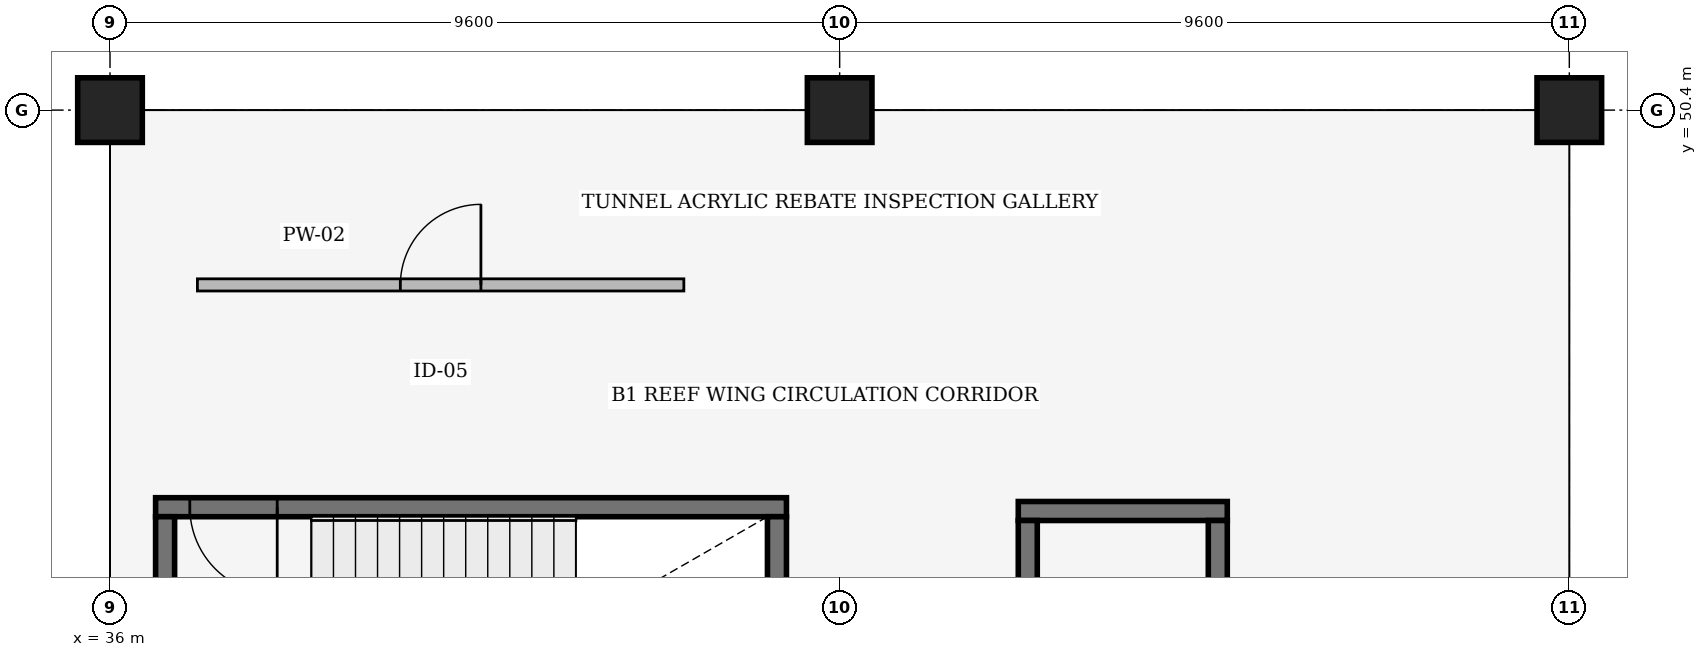
"""IFC4 building model, lengths in metres.
Left out: names, types, materials, properties, quantities, classifications, styles, units other than length and angle.
Written with IfcOpenShell. Run it as: python <this file> out.ifc"""

import sys

from ifc_helpers import new_model, si_unit, direction, frame, frame_2d, origin, origin_2d, place, context, subcontext, project, spatial, rectangle, extrude, element, fill, save


model = new_model("IFC4")
c1 = context("Model", 3, precision=1e-05, world=origin(), true_north=direction((0.0, 1.0)))
c2 = subcontext(c1, "Body", "Model", "MODEL_VIEW")
j1 = project(units=[si_unit("LENGTHUNIT", "METRE"), si_unit("PLANEANGLEUNIT", "RADIAN")], contexts=[c1])
p1 = place(None, origin())
s1 = spatial("IfcSite", under=j1, at=p1, CompositionType="ELEMENT")
p2 = place(p1, origin())
s2 = spatial("IfcBuilding", under=s1, at=p2, CompositionType="ELEMENT")
p3 = place(p2, frame((0.0, 0.0, -4.8)))
s3 = spatial("IfcBuildingStorey", under=s2, at=p3, CompositionType="ELEMENT", Elevation=-4.8)
for number, where, z_axis, x_axis in (
    (1, (36.0, 50.4, 0.0), (0.0, 0.0, 1.0), (1.0, 0.0, 0.0)),
    (2, (45.6, 50.4, 0.0), (0.0, 0.0, 1.0), (1.0, 0.0, 0.0)),
    (3, (55.2, 50.4, 0.0), (0.0, 0.0, 1.0), (1.0, 0.0, 0.0)),
):
    element("IfcColumn", number, at=place(p3, frame(where, z_axis=z_axis, x_axis=x_axis)), inside=s3, PredefinedType="COLUMN", context=c2, shape_type="SweptSolid", body=[
        extrude(rectangle(XDim=0.85, YDim=0.85, at=origin_2d()), origin(), (0.0, 0.0, 1.0), 4.8),
    ])
p4 = place(p3, frame((44.9, 45.175, 0.0), z_axis=(0.0, 0.0, 1.0), x_axis=(-1.0, 0.0, 0.0)))
e4 = element("IfcWall", 4, at=p4, inside=s3, PredefinedType="SHEAR", context=c2, shape_type="SweptSolid", body=[
    extrude(rectangle(XDim=8.3, YDim=0.25, at=frame_2d((4.15, 0.0))), origin(), (0.0, 0.0, 1.0), 4.4),
])
p5 = place(p4, frame((7.85, 0.0, 0.0), z_axis=(0.0, 0.0, 1.0), x_axis=(-1.0, 0.0, 0.0)))
e5 = element("IfcOpeningElement", 5, at=p5, cuts=e4, PredefinedType="OPENING", context=c2, shape_type="SweptSolid", body=[
    extrude(rectangle(XDim=1.15, YDim=2.2, at=frame_2d((0.575, 1.1))), frame((0.0, 0.135, 0.0), z_axis=(0.0, -1.0, 0.0), x_axis=(1.0, 0.0, 0.0)), (0.0, 0.0, 1.0), 0.27),
])
for number, where, z_axis, x_axis in (
    (6, (36.725, 45.05, 0.0), (0.0, 0.0, 1.0), (0.0, -1.0, 0.0)),
    (7, (44.775, 41.6, 0.0), (0.0, 0.0, 1.0), (0.0, 1.0, 0.0)),
):
    element("IfcWall", number, at=place(p3, frame(where, z_axis=z_axis, x_axis=x_axis)), inside=s3, PredefinedType="SHEAR", context=c2, shape_type="SweptSolid", body=[
        extrude(rectangle(XDim=3.45, YDim=0.25, at=frame_2d((1.725, 0.0))), origin(), (0.0, 0.0, 1.0), 4.4),
    ])
p6 = place(p3, frame((47.95, 45.125, 0.0), z_axis=(0.0, 0.0, 1.0), x_axis=(1.0, 0.0, 0.0)))
e8 = element("IfcWall", 8, at=p6, inside=s3, PredefinedType="SHEAR", context=c2, shape_type="SweptSolid", body=[
    extrude(rectangle(XDim=2.75, YDim=0.25, at=frame_2d((1.375, 0.0))), origin(), (0.0, 0.0, 1.0), 4.4),
])
for number, where, z_axis, x_axis in (
    (9, (48.075, 42.0, 0.0), (0.0, 0.0, 1.0), (0.0, 1.0, 0.0)),
    (10, (50.575, 42.0, 0.0), (0.0, 0.0, 1.0), (0.0, 1.0, 0.0)),
):
    element("IfcWall", number, at=place(p3, frame(where, z_axis=z_axis, x_axis=x_axis)), inside=s3, PredefinedType="SHEAR", context=c2, shape_type="SweptSolid", body=[
        extrude(rectangle(XDim=3.0, YDim=0.25, at=frame_2d((1.5, 0.0))), origin(), (0.0, 0.0, 1.0), 4.4),
    ])
p7 = place(p3, frame((37.15, 48.1, 0.0), z_axis=(0.0, 0.0, 1.0), x_axis=(1.0, 0.0, 0.0)))
e11 = element("IfcWall", 11, at=p7, inside=s3, PredefinedType="PARTITIONING", context=c2, shape_type="SweptSolid", body=[
    extrude(rectangle(XDim=6.4, YDim=0.16, at=frame_2d((3.2, 0.0))), origin(), (0.0, 0.0, 1.0), 4.056),
])
p8 = place(p7, frame((2.67, 0.0, 0.0)))
e12 = element("IfcOpeningElement", 12, at=p8, cuts=e11, PredefinedType="OPENING", context=c2, shape_type="SweptSolid", body=[
    extrude(rectangle(XDim=1.06, YDim=2.2, at=frame_2d((0.53, 1.1))), frame((0.0, 0.09, 0.0), z_axis=(0.0, -1.0, 0.0), x_axis=(1.0, 0.0, 0.0)), (0.0, 0.0, 1.0), 0.18),
])
p9 = place(p5, origin())
e13 = element("IfcDoor", 13, at=p9, inside=s3, OperationType="SINGLE_SWING_RIGHT", PredefinedType="DOOR", context=c2, shape_type="SweptSolid", body=[
    extrude(rectangle(XDim=1.15, YDim=2.2, at=frame_2d((0.575, 1.1))), frame((0.0, 0.025, 0.0), z_axis=(0.0, -1.0, 0.0), x_axis=(1.0, 0.0, 0.0)), (0.0, 0.0, 1.0), 0.05),
])
fill(e5, e13)
p10 = place(p8, origin())
e14 = element("IfcDoor", 14, at=p10, inside=s3, OperationType="SINGLE_SWING_RIGHT", PredefinedType="DOOR", context=c2, shape_type="SweptSolid", body=[
    extrude(rectangle(XDim=1.06, YDim=2.2, at=frame_2d((0.53, 1.1))), frame((0.0, 0.025, 0.0), z_axis=(0.0, -1.0, 0.0), x_axis=(1.0, 0.0, 0.0)), (0.0, 0.0, 1.0), 0.05),
])
fill(e12, e14)
save(model, sys.argv[1])
